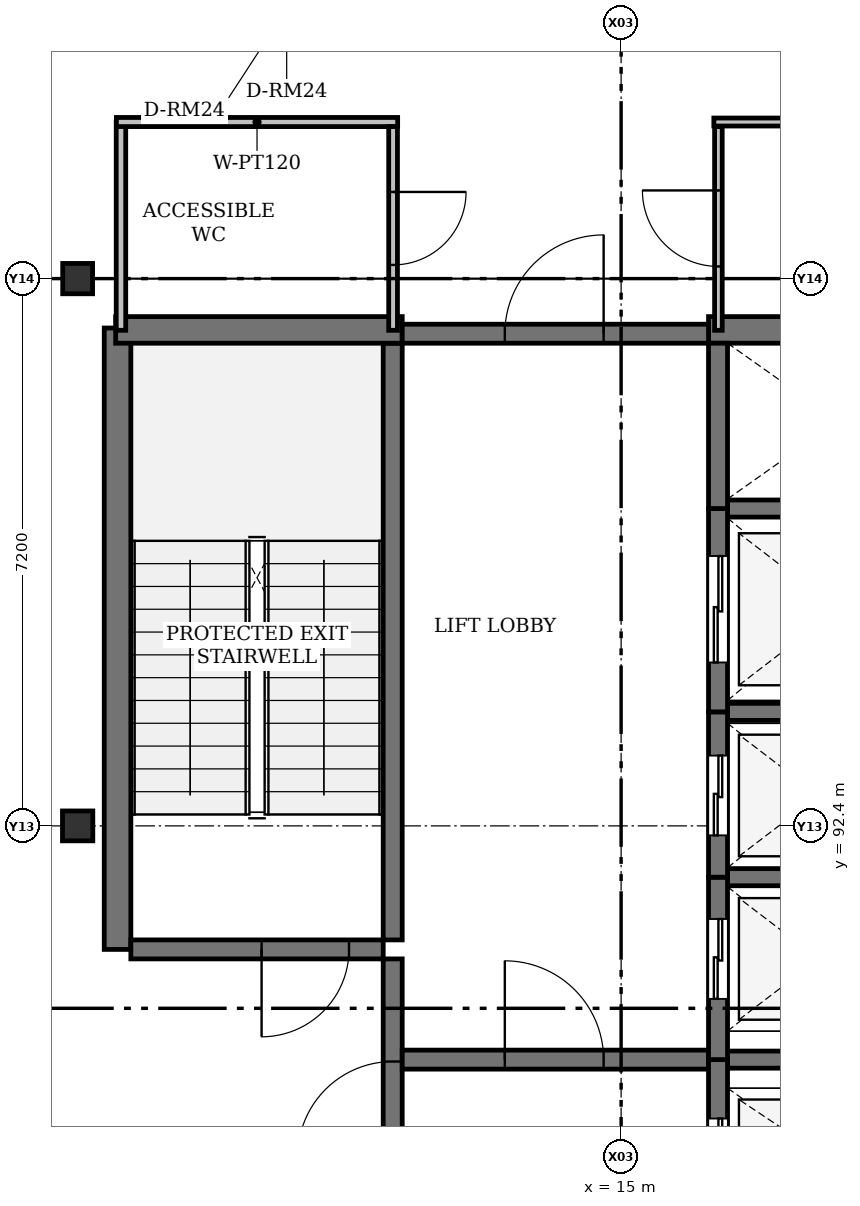
"""IFC4 building model, lengths in metres.
Left out: names, types, materials, properties, quantities, classifications, styles, units other than length and angle.
Written with IfcOpenShell. Run it as: python <this file> out.ifc"""

import sys

from ifc_helpers import new_model, si_unit, direction, frame, frame_2d, origin, origin_2d, place, context, subcontext, project, spatial, rectangle, i_section, extrude, element, fill, save


model = new_model("IFC4")
c1 = context("Model", 3, precision=1e-05, world=origin(), true_north=direction((0.0, 1.0)))
c2 = subcontext(c1, "Body", "Model", "MODEL_VIEW")
j1 = project(units=[si_unit("LENGTHUNIT", "METRE"), si_unit("PLANEANGLEUNIT", "RADIAN")], contexts=[c1])
p1 = place(None, origin())
s1 = spatial("IfcSite", under=j1, at=p1, CompositionType="ELEMENT")
p2 = place(p1, origin())
s2 = spatial("IfcBuilding", under=s1, at=p2, CompositionType="ELEMENT")
p3 = place(p2, frame((0.0, 0.0, 5.4)))
s3 = spatial("IfcBuildingStorey", under=s2, at=p3, CompositionType="ELEMENT", Elevation=5.4)
for number, where, z_axis, x_axis in (
    (1, (7.85, 92.4, 0.0), (0.0, 0.0, 1.0), (1.0, 0.0, 0.0)),
    (2, (7.85, 99.6, 0.0), (0.0, 0.0, 1.0), (0.0, 1.0, 0.0)),
):
    element("IfcColumn", number, at=place(p3, frame(where, z_axis=z_axis, x_axis=x_axis)), inside=s3, PredefinedType="COLUMN", context=c2, shape_type="SweptSolid", body=[
        extrude(i_section(OverallWidth=0.399, OverallDepth=0.393, WebThickness=0.023, FlangeThickness=0.036, FilletRadius=0.015, at=origin_2d()), origin(), (0.0, 0.0, 1.0), 4.5),
    ])
p4 = place(p3, frame((8.375, 90.775, 0.0), z_axis=(0.0, 0.0, 1.0), x_axis=(0.0, 1.0, 0.0)))
e3 = element("IfcWall", 3, at=p4, inside=s3, PredefinedType="SHEAR", context=c2, shape_type="SweptSolid", body=[
    extrude(rectangle(XDim=8.175, YDim=0.35, at=frame_2d((4.087, 0.0))), origin(), (0.0, 0.0, 1.0), 4.5),
])
p5 = place(p3, frame((11.995, 90.9, 0.0), z_axis=(0.0, 0.0, 1.0), x_axis=(0.0, 1.0, 0.0)))
e4 = element("IfcWall", 4, at=p5, inside=s3, PredefinedType="SHEAR", context=c2, shape_type="SweptSolid", body=[
    extrude(rectangle(XDim=7.85, YDim=0.25, at=frame_2d((3.925, 0.0))), origin(), (0.0, 0.0, 1.0), 4.5),
])
p6 = place(p3, frame((11.995, 86.75, 0.0), z_axis=(0.0, 0.0, 1.0), x_axis=(0.0, 1.0, 0.0)))
e5 = element("IfcWall", 5, at=p6, inside=s3, PredefinedType="SHEAR", context=c2, shape_type="SweptSolid", body=[
    extrude(rectangle(XDim=3.9, YDim=0.25, at=frame_2d((1.95, 0.0))), origin(), (0.0, 0.0, 1.0), 4.5),
])
p7 = place(p6, frame((1.3, 0.0, 0.0)))
e6 = element("IfcOpeningElement", 6, at=p7, cuts=e5, PredefinedType="OPENING", context=c2, shape_type="SweptSolid", body=[
    extrude(rectangle(XDim=1.25, YDim=2.2, at=frame_2d((0.625, 1.1))), frame((0.0, 0.125, 0.0), z_axis=(0.0, -1.0, 0.0), x_axis=(1.0, 0.0, 0.0)), (0.0, 0.0, 1.0), 0.25),
])
p8 = place(p3, frame((8.35, 98.925, 0.0), z_axis=(0.0, 0.0, 1.0), x_axis=(1.0, 0.0, 0.0)))
e7 = element("IfcWall", 7, at=p8, inside=s3, PredefinedType="SHEAR", context=c2, shape_type="SweptSolid", body=[
    extrude(rectangle(XDim=3.77, YDim=0.35, at=frame_2d((1.885, 0.0))), origin(), (0.0, 0.0, 1.0), 4.5),
])
p9 = place(p3, frame((16.15, 98.925, 0.0), z_axis=(0.0, 0.0, 1.0), x_axis=(1.0, 0.0, 0.0)))
e8 = element("IfcWall", 8, at=p9, inside=s3, PredefinedType="SHEAR", context=c2, shape_type="SweptSolid", body=[
    extrude(rectangle(XDim=3.3, YDim=0.35, at=frame_2d((1.65, 0.0))), origin(), (0.0, 0.0, 1.0), 4.5),
])
p10 = place(p3, frame((12.12, 98.875, 0.0), z_axis=(0.0, 0.0, 1.0), x_axis=(1.0, 0.0, 0.0)))
e9 = element("IfcWall", 9, at=p10, inside=s3, PredefinedType="SHEAR", context=c2, shape_type="SweptSolid", body=[
    extrude(rectangle(XDim=4.03, YDim=0.25, at=frame_2d((2.015, 0.0))), origin(), (0.0, 0.0, 1.0), 4.5),
])
p11 = place(p10, frame((1.35, 0.0, 0.0)))
e10 = element("IfcOpeningElement", 10, at=p11, cuts=e9, PredefinedType="OPENING", context=c2, shape_type="SweptSolid", body=[
    extrude(rectangle(XDim=1.3, YDim=2.2, at=frame_2d((0.65, 1.1))), frame((0.0, 0.125, 0.0), z_axis=(0.0, -1.0, 0.0), x_axis=(1.0, 0.0, 0.0)), (0.0, 0.0, 1.0), 0.25),
])
p12 = place(p3, frame((11.87, 90.775, 0.0), z_axis=(0.0, 0.0, 1.0), x_axis=(-1.0, 0.0, 0.0)))
e11 = element("IfcWall", 11, at=p12, inside=s3, PredefinedType="SHEAR", context=c2, shape_type="SweptSolid", body=[
    extrude(rectangle(XDim=3.32, YDim=0.25, at=frame_2d((1.66, 0.0))), origin(), (0.0, 0.0, 1.0), 4.5),
])
p13 = place(p12, frame((0.45, 0.0, 0.0)))
e12 = element("IfcOpeningElement", 12, at=p13, cuts=e11, PredefinedType="OPENING", context=c2, shape_type="SweptSolid", body=[
    extrude(rectangle(XDim=1.15, YDim=2.15, at=frame_2d((0.575, 1.075))), frame((0.0, 0.125, 0.0), z_axis=(0.0, -1.0, 0.0), x_axis=(1.0, 0.0, 0.0)), (0.0, 0.0, 1.0), 0.25),
])
p14 = place(p3, frame((12.12, 89.325, 0.0), z_axis=(0.0, 0.0, 1.0), x_axis=(1.0, 0.0, 0.0)))
e13 = element("IfcWall", 13, at=p14, inside=s3, PredefinedType="SHEAR", context=c2, shape_type="SweptSolid", body=[
    extrude(rectangle(XDim=4.03, YDim=0.25, at=frame_2d((2.015, 0.0))), origin(), (0.0, 0.0, 1.0), 4.5),
])
p15 = place(p14, frame((1.35, 0.0, 0.0)))
e14 = element("IfcOpeningElement", 14, at=p15, cuts=e13, PredefinedType="OPENING", context=c2, shape_type="SweptSolid", body=[
    extrude(rectangle(XDim=1.3, YDim=2.2, at=frame_2d((0.65, 1.1))), frame((0.0, 0.125, 0.0), z_axis=(0.0, -1.0, 0.0), x_axis=(1.0, 0.0, 0.0)), (0.0, 0.0, 1.0), 0.25),
])
for number, where, z_axis, x_axis in (
    (15, (16.4, 89.325, 0.0), (0.0, 0.0, 1.0), (1.0, 0.0, 0.0)),
    (16, (16.4, 91.725, 0.0), (0.0, 0.0, 1.0), (1.0, 0.0, 0.0)),
    (17, (16.4, 93.9, 0.0), (0.0, 0.0, 1.0), (1.0, 0.0, 0.0)),
    (18, (16.4, 96.575, 0.0), (0.0, 0.0, 1.0), (1.0, 0.0, 0.0)),
):
    element("IfcWall", number, at=place(p3, frame(where, z_axis=z_axis, x_axis=x_axis)), inside=s3, PredefinedType="SHEAR", context=c2, shape_type="SweptSolid", body=[
        extrude(rectangle(XDim=2.8, YDim=0.225, at=frame_2d((1.4, 0.0))), origin(), (0.0, 0.0, 1.0), 4.5),
    ])
p16 = place(p3, frame((16.275, 86.925, 0.0), z_axis=(0.0, 0.0, 1.0), x_axis=(0.0, 1.0, 0.0)))
e19 = element("IfcWall", 19, at=p16, inside=s3, PredefinedType="SHEAR", context=c2, shape_type="SweptSolid", body=[
    extrude(rectangle(XDim=2.4, YDim=0.25, at=frame_2d((1.2, 0.0))), origin(), (0.0, 0.0, 1.0), 4.5),
])
p17 = place(p16, frame((0.525, 0.0, 0.0)))
e20 = element("IfcOpeningElement", 20, at=p17, cuts=e19, PredefinedType="OPENING", context=c2, shape_type="SweptSolid", body=[
    extrude(rectangle(XDim=1.1, YDim=2.15, at=frame_2d((0.55, 1.075))), frame((0.0, 0.125, 0.0), z_axis=(0.0, -1.0, 0.0), x_axis=(1.0, 0.0, 0.0)), (0.0, 0.0, 1.0), 0.25),
])
p18 = place(p3, frame((16.275, 89.325, 0.0), z_axis=(0.0, 0.0, 1.0), x_axis=(0.0, 1.0, 0.0)))
e21 = element("IfcWall", 21, at=p18, inside=s3, PredefinedType="SHEAR", context=c2, shape_type="SweptSolid", body=[
    extrude(rectangle(XDim=2.4, YDim=0.25, at=frame_2d((1.2, 0.0))), origin(), (0.0, 0.0, 1.0), 4.5),
])
p19 = place(p18, frame((0.8, 0.0, 0.0)))
e22 = element("IfcOpeningElement", 22, at=p19, cuts=e21, PredefinedType="OPENING", context=c2, shape_type="SweptSolid", body=[
    extrude(rectangle(XDim=1.05, YDim=2.15, at=frame_2d((0.525, 1.075))), frame((0.0, 0.125, 0.0), z_axis=(0.0, -1.0, 0.0), x_axis=(1.0, 0.0, 0.0)), (0.0, 0.0, 1.0), 0.25),
])
p20 = place(p3, frame((16.275, 91.725, 0.0), z_axis=(0.0, 0.0, 1.0), x_axis=(0.0, 1.0, 0.0)))
e23 = element("IfcWall", 23, at=p20, inside=s3, PredefinedType="SHEAR", context=c2, shape_type="SweptSolid", body=[
    extrude(rectangle(XDim=2.175, YDim=0.25, at=frame_2d((1.087, 0.0))), origin(), (0.0, 0.0, 1.0), 4.5),
])
p21 = place(p20, frame((0.55, 0.0, 0.0)))
e24 = element("IfcOpeningElement", 24, at=p21, cuts=e23, PredefinedType="OPENING", context=c2, shape_type="SweptSolid", body=[
    extrude(rectangle(XDim=1.05, YDim=2.15, at=frame_2d((0.525, 1.075))), frame((0.0, 0.125, 0.0), z_axis=(0.0, -1.0, 0.0), x_axis=(1.0, 0.0, 0.0)), (0.0, 0.0, 1.0), 0.25),
])
p22 = place(p3, frame((16.275, 93.9, 0.0), z_axis=(0.0, 0.0, 1.0), x_axis=(0.0, 1.0, 0.0)))
e25 = element("IfcWall", 25, at=p22, inside=s3, PredefinedType="SHEAR", context=c2, shape_type="SweptSolid", body=[
    extrude(rectangle(XDim=2.675, YDim=0.25, at=frame_2d((1.337, 0.0))), origin(), (0.0, 0.0, 1.0), 4.5),
])
p23 = place(p22, frame((0.65, 0.0, 0.0)))
e26 = element("IfcOpeningElement", 26, at=p23, cuts=e25, PredefinedType="OPENING", context=c2, shape_type="SweptSolid", body=[
    extrude(rectangle(XDim=1.4, YDim=2.25, at=frame_2d((0.7, 1.125))), frame((0.0, 0.125, 0.0), z_axis=(0.0, -1.0, 0.0), x_axis=(1.0, 0.0, 0.0)), (0.0, 0.0, 1.0), 0.25),
])
p24 = place(p3, frame((16.275, 96.575, 0.0), z_axis=(0.0, 0.0, 1.0), x_axis=(0.0, 1.0, 0.0)))
e27 = element("IfcWall", 27, at=p24, inside=s3, PredefinedType="SHEAR", context=c2, shape_type="SweptSolid", body=[
    extrude(rectangle(XDim=2.175, YDim=0.25, at=frame_2d((1.087, 0.0))), origin(), (0.0, 0.0, 1.0), 4.5),
])
p25 = place(p3, frame((8.42, 98.92, 0.0), z_axis=(0.0, 0.0, 1.0), x_axis=(0.0, 1.0, 0.0)))
e28 = element("IfcWall", 28, at=p25, inside=s3, PredefinedType="PARTITIONING", context=c2, shape_type="SweptSolid", body=[
    extrude(rectangle(XDim=2.74, YDim=0.125, at=frame_2d((1.37, 0.0))), origin(), (0.0, 0.0, 1.0), 3.721),
])
p26 = place(p3, frame((8.36, 101.66, 0.0), z_axis=(0.0, 0.0, 1.0), x_axis=(1.0, 0.0, 0.0)))
e29 = element("IfcWall", 29, at=p26, inside=s3, PredefinedType="PARTITIONING", context=c2, shape_type="SweptSolid", body=[
    extrude(rectangle(XDim=3.7, YDim=0.12, at=frame_2d((1.85, 0.0))), origin(), (0.0, 0.0, 1.0), 4.25),
])
p27 = place(p3, frame((12.0, 101.6, 0.0), z_axis=(0.0, 0.0, 1.0), x_axis=(0.0, -1.0, 0.0)))
e30 = element("IfcWall", 30, at=p27, inside=s3, PredefinedType="PARTITIONING", context=c2, shape_type="SweptSolid", body=[
    extrude(rectangle(XDim=2.68, YDim=0.115, at=frame_2d((1.34, 0.0))), origin(), (0.0, 0.0, 1.0), 3.721),
])
p28 = place(p27, frame((0.86, 0.0, 0.0)))
e31 = element("IfcOpeningElement", 31, at=p28, cuts=e30, PredefinedType="OPENING", context=c2, shape_type="SweptSolid", body=[
    extrude(rectangle(XDim=0.96, YDim=2.15, at=frame_2d((0.48, 1.075))), frame((0.0, 0.058, 0.0), z_axis=(0.0, -1.0, 0.0), x_axis=(1.0, 0.0, 0.0)), (0.0, 0.0, 1.0), 0.115),
])
p29 = place(p3, frame((19.38, 101.66, 0.0), z_axis=(0.0, 0.0, 1.0), x_axis=(-1.0, 0.0, 0.0)))
e32 = element("IfcWall", 32, at=p29, inside=s3, PredefinedType="PARTITIONING", context=c2, shape_type="SweptSolid", body=[
    extrude(rectangle(XDim=3.16, YDim=0.105, at=frame_2d((1.58, 0.0))), origin(), (0.0, 0.0, 1.0), 4.25),
])
p30 = place(p3, frame((16.28, 98.92, 0.0), z_axis=(0.0, 0.0, 1.0), x_axis=(0.0, 1.0, 0.0)))
e33 = element("IfcWall", 33, at=p30, inside=s3, PredefinedType="PARTITIONING", context=c2, shape_type="SweptSolid", body=[
    extrude(rectangle(XDim=2.68, YDim=0.1, at=frame_2d((1.34, 0.0))), origin(), (0.0, 0.0, 1.0), 3.721),
])
p31 = place(p30, frame((0.84, 0.0, 0.0)))
e34 = element("IfcOpeningElement", 34, at=p31, cuts=e33, PredefinedType="OPENING", context=c2, shape_type="SweptSolid", body=[
    extrude(rectangle(XDim=1.0, YDim=2.15, at=frame_2d((0.5, 1.075))), frame((0.0, 0.05, 0.0), z_axis=(0.0, -1.0, 0.0), x_axis=(1.0, 0.0, 0.0)), (0.0, 0.0, 1.0), 0.1),
])
p32 = place(p7, origin())
e35 = element("IfcDoor", 35, at=p32, inside=s3, OperationType="SINGLE_SWING_LEFT", PredefinedType="DOOR", context=c2, shape_type="SweptSolid", body=[
    extrude(rectangle(XDim=1.25, YDim=2.2, at=frame_2d((0.625, 1.1))), frame((0.0, 0.025, 0.0), z_axis=(0.0, -1.0, 0.0), x_axis=(1.0, 0.0, 0.0)), (0.0, 0.0, 1.0), 0.05),
])
fill(e6, e35)
p33 = place(p11, origin())
e36 = element("IfcDoor", 36, at=p33, inside=s3, OperationType="SINGLE_SWING_RIGHT", PredefinedType="DOOR", context=c2, shape_type="SweptSolid", body=[
    extrude(rectangle(XDim=1.3, YDim=2.2, at=frame_2d((0.65, 1.1))), frame((0.0, 0.025, 0.0), z_axis=(0.0, -1.0, 0.0), x_axis=(1.0, 0.0, 0.0)), (0.0, 0.0, 1.0), 0.05),
])
fill(e10, e36)
p34 = place(p13, origin())
e37 = element("IfcDoor", 37, at=p34, inside=s3, OperationType="SINGLE_SWING_RIGHT", PredefinedType="DOOR", context=c2, shape_type="SweptSolid", body=[
    extrude(rectangle(XDim=1.15, YDim=2.15, at=frame_2d((0.575, 1.075))), frame((0.0, 0.025, 0.0), z_axis=(0.0, -1.0, 0.0), x_axis=(1.0, 0.0, 0.0)), (0.0, 0.0, 1.0), 0.05),
])
fill(e12, e37)
p35 = place(p15, origin())
e38 = element("IfcDoor", 38, at=p35, inside=s3, OperationType="SINGLE_SWING_LEFT", PredefinedType="DOOR", context=c2, shape_type="SweptSolid", body=[
    extrude(rectangle(XDim=1.3, YDim=2.2, at=frame_2d((0.65, 1.1))), frame((0.0, 0.025, 0.0), z_axis=(0.0, -1.0, 0.0), x_axis=(1.0, 0.0, 0.0)), (0.0, 0.0, 1.0), 0.05),
])
fill(e14, e38)
p36 = place(p17, origin())
e39 = element("IfcDoor", 39, at=p36, inside=s3, OperationType="SLIDING_TO_LEFT", PredefinedType="DOOR", context=c2, shape_type="SweptSolid", body=[
    extrude(rectangle(XDim=1.1, YDim=2.15, at=frame_2d((0.55, 1.075))), frame((0.0, 0.025, 0.0), z_axis=(0.0, -1.0, 0.0), x_axis=(1.0, 0.0, 0.0)), (0.0, 0.0, 1.0), 0.05),
])
fill(e20, e39)
p37 = place(p19, origin())
e40 = element("IfcDoor", 40, at=p37, inside=s3, OperationType="SLIDING_TO_LEFT", PredefinedType="DOOR", context=c2, shape_type="SweptSolid", body=[
    extrude(rectangle(XDim=1.05, YDim=2.15, at=frame_2d((0.525, 1.075))), frame((0.0, 0.025, 0.0), z_axis=(0.0, -1.0, 0.0), x_axis=(1.0, 0.0, 0.0)), (0.0, 0.0, 1.0), 0.05),
])
fill(e22, e40)
p38 = place(p21, origin())
e41 = element("IfcDoor", 41, at=p38, inside=s3, OperationType="SLIDING_TO_LEFT", PredefinedType="DOOR", context=c2, shape_type="SweptSolid", body=[
    extrude(rectangle(XDim=1.05, YDim=2.15, at=frame_2d((0.525, 1.075))), frame((0.0, 0.025, 0.0), z_axis=(0.0, -1.0, 0.0), x_axis=(1.0, 0.0, 0.0)), (0.0, 0.0, 1.0), 0.05),
])
fill(e24, e41)
p39 = place(p23, origin())
e42 = element("IfcDoor", 42, at=p39, inside=s3, OperationType="SLIDING_TO_LEFT", PredefinedType="DOOR", context=c2, shape_type="SweptSolid", body=[
    extrude(rectangle(XDim=1.4, YDim=2.25, at=frame_2d((0.7, 1.125))), frame((0.0, 0.025, 0.0), z_axis=(0.0, -1.0, 0.0), x_axis=(1.0, 0.0, 0.0)), (0.0, 0.0, 1.0), 0.05),
])
fill(e26, e42)
p40 = place(p28, origin())
e43 = element("IfcDoor", 43, at=p40, inside=s3, OperationType="SINGLE_SWING_LEFT", PredefinedType="DOOR", context=c2, shape_type="SweptSolid", body=[
    extrude(rectangle(XDim=0.96, YDim=2.15, at=frame_2d((0.48, 1.075))), frame((0.0, 0.025, 0.0), z_axis=(0.0, -1.0, 0.0), x_axis=(1.0, 0.0, 0.0)), (0.0, 0.0, 1.0), 0.05),
])
fill(e31, e43)
p41 = place(p31, origin())
e44 = element("IfcDoor", 44, at=p41, inside=s3, OperationType="SINGLE_SWING_RIGHT", PredefinedType="DOOR", context=c2, shape_type="SweptSolid", body=[
    extrude(rectangle(XDim=1.0, YDim=2.15, at=frame_2d((0.5, 1.075))), frame((0.0, 0.025, 0.0), z_axis=(0.0, -1.0, 0.0), x_axis=(1.0, 0.0, 0.0)), (0.0, 0.0, 1.0), 0.05),
])
fill(e34, e44)
save(model, sys.argv[1])
